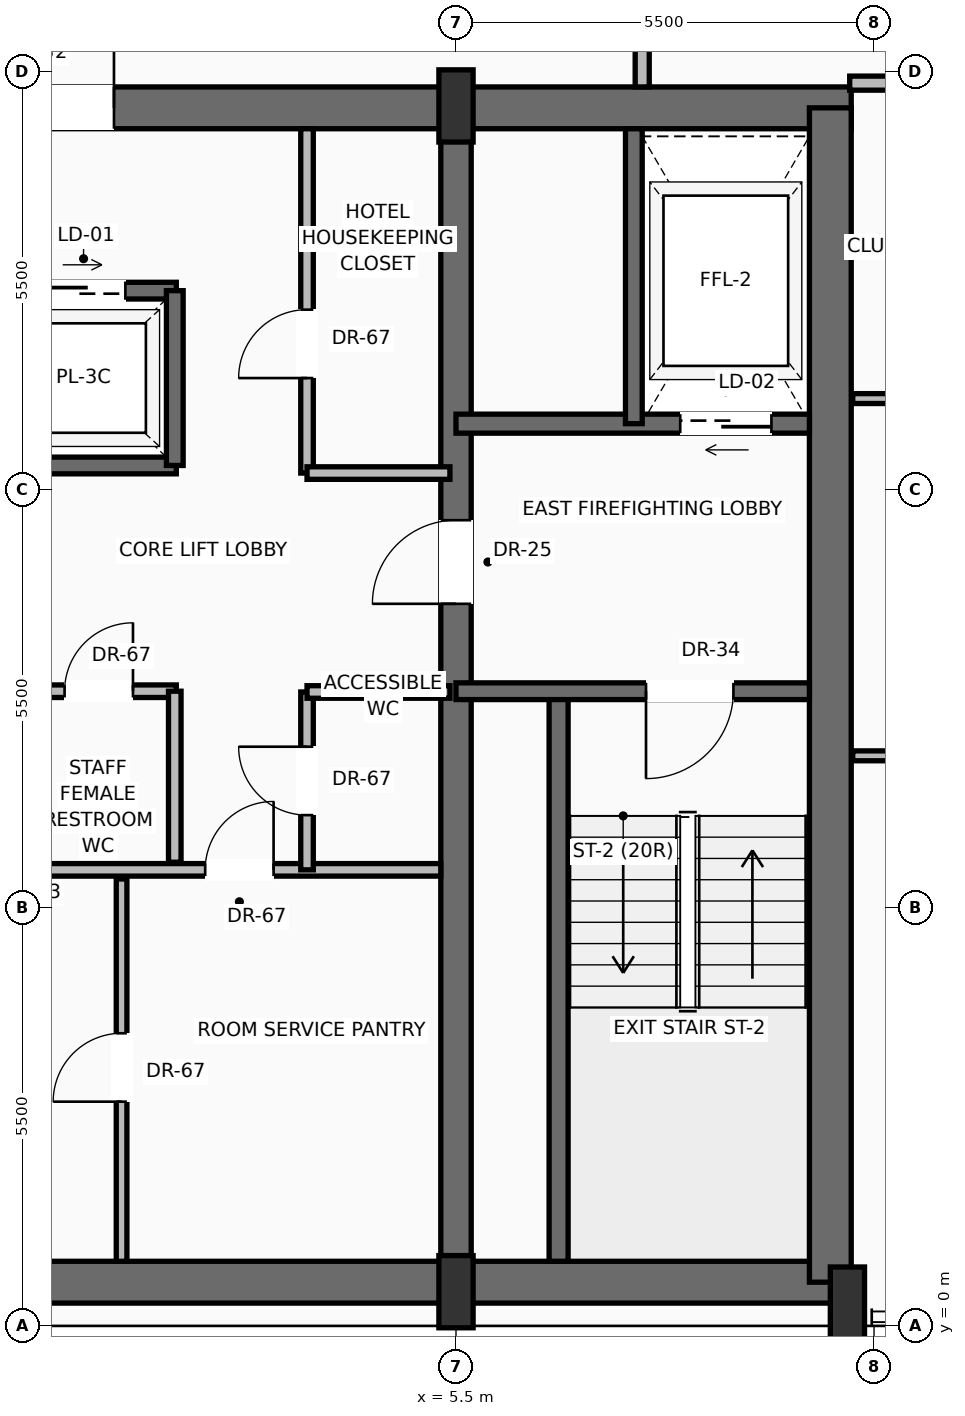
"""IFC4 building model, lengths in metres.
Left out: names, types, materials, properties, quantities, classifications, styles, units other than length and angle.
Written with IfcOpenShell. Run it as: python <this file> out.ifc"""

import sys

from ifc_helpers import new_model, si_unit, direction, frame, frame_2d, origin, origin_2d, place, context, subcontext, project, spatial, rectangle, extrude, source, transform, mapped, element, fill, save


model = new_model("IFC4")
c1 = context("Model", 3, precision=1e-05, world=origin(), true_north=direction((0.0, 1.0)))
c2 = subcontext(c1, "Body", "Model", "MODEL_VIEW")
j1 = project(units=[si_unit("LENGTHUNIT", "METRE"), si_unit("PLANEANGLEUNIT", "RADIAN")], contexts=[c1])
p1 = place(None, origin())
s1 = spatial("IfcSite", under=j1, at=p1, CompositionType="ELEMENT")
p2 = place(p1, origin())
s2 = spatial("IfcBuilding", under=s1, at=p2, CompositionType="ELEMENT")
p3 = place(p2, frame((0.0, 0.0, 237.25)))
s3 = spatial("IfcBuildingStorey", under=s2, at=p3, CompositionType="ELEMENT", Elevation=237.25)
p4 = place(p3, frame((-10.65, 0.575, 0.0), z_axis=(0.0, 0.0, 1.0), x_axis=(1.0, 0.0, 0.0)))
e1 = element("IfcWall", 1, at=p4, inside=s3, PredefinedType="SHEAR", context=c2, shape_type="SweptSolid", body=[
    extrude(rectangle(XDim=21.3, YDim=0.55, at=frame_2d((10.65, 0.0))), origin(), (0.0, 0.0, 1.0), 3.24),
])
p5 = place(p3, frame((-10.7, 16.025, 0.0), z_axis=(0.0, 0.0, 1.0), x_axis=(1.0, 0.0, 0.0)))
e2 = element("IfcWall", 2, at=p5, inside=s3, PredefinedType="SHEAR", context=c2, shape_type="SweptSolid", body=[
    extrude(rectangle(XDim=21.4, YDim=0.55, at=frame_2d((10.7, 0.0))), origin(), (0.0, 0.0, 1.0), 3.24),
])
p6 = place(p5, frame((3.27, 0.0, 0.0)))
e3 = element("IfcOpeningElement", 3, at=p6, cuts=e2, PredefinedType="OPENING", context=c2, shape_type="SweptSolid", body=[
    extrude(rectangle(XDim=1.3, YDim=2.3, at=frame_2d((0.65, 1.15))), frame((0.0, 0.285, 0.0), z_axis=(0.0, -1.0, 0.0), x_axis=(1.0, 0.0, 0.0)), (0.0, 0.0, 1.0), 0.57),
])
p7 = place(p5, frame((9.7, 0.0, 0.0)))
e4 = element("IfcOpeningElement", 4, at=p7, cuts=e2, PredefinedType="OPENING", context=c2, shape_type="SweptSolid", body=[
    extrude(rectangle(XDim=2.0, YDim=2.4, at=frame_2d((1.0, 1.2))), frame((0.0, 0.285, 0.0), z_axis=(0.0, -1.0, 0.0), x_axis=(1.0, 0.0, 0.0)), (0.0, 0.0, 1.0), 0.57),
])
p8 = place(p3, frame((10.425, 0.575, 0.0), z_axis=(0.0, 0.0, 1.0), x_axis=(0.0, 1.0, 0.0)))
e5 = element("IfcWall", 5, at=p8, inside=s3, PredefinedType="SHEAR", context=c2, shape_type="SweptSolid", body=[
    extrude(rectangle(XDim=15.45, YDim=0.55, at=frame_2d((7.725, 0.0))), origin(), (0.0, 0.0, 1.0), 3.24),
])
p9 = place(p3, frame((5.5, 0.575, 0.0), z_axis=(0.0, 0.0, 1.0), x_axis=(0.0, 1.0, 0.0)))
e6 = element("IfcWall", 6, at=p9, inside=s3, PredefinedType="SHEAR", context=c2, shape_type="SweptSolid", body=[
    extrude(rectangle(XDim=15.45, YDim=0.4, at=frame_2d((7.725, 0.0))), origin(), (0.0, 0.0, 1.0), 3.24),
])
p10 = place(p9, frame((8.925, 0.0, 0.0)))
e7 = element("IfcOpeningElement", 7, at=p10, cuts=e6, PredefinedType="OPENING", context=c2, shape_type="SweptSolid", body=[
    extrude(rectangle(XDim=1.1, YDim=2.2, at=frame_2d((0.55, 1.1))), frame((0.0, 0.21, 0.0), z_axis=(0.0, -1.0, 0.0), x_axis=(1.0, 0.0, 0.0)), (0.0, 0.0, 1.0), 0.42),
])
m1 = source(origin(), c2, "Body", "SweptSolid", [
    extrude(rectangle(XDim=0.45, YDim=0.95, at=origin_2d()), origin(), (0.0, 0.0, 1.0), 3.45),
])
for number, where, z_axis, x_axis in (
    (8, (5.5, 0.45, 0.0), (0.0, 0.0, 1.0), (1.0, 0.0, 0.0)),
    (9, (10.65, 0.3, 0.0), (0.0, 0.0, 1.0), (1.0, 0.0, 0.0)),
    (10, (5.5, 16.05, 0.0), (0.0, 0.0, 1.0), (1.0, 0.0, 0.0)),
):
    element("IfcColumn", number, at=place(p3, frame(where, z_axis=z_axis, x_axis=x_axis)), inside=s3, PredefinedType="PILASTER", context=c2, shape_type="MappedRepresentation", body=[
        mapped(m1, transform((0.0, 0.0, 0.0), scale=1.0)),
    ])
p11 = place(p3, frame((8.545, 32.072, 0.0), z_axis=(0.0, 0.0, 1.0), x_axis=(0.52585107611, -0.850576654837, 0.0)))
e11 = element("IfcWall", 11, at=p11, inside=s3, PredefinedType="SOLIDWALL", context=c2, shape_type="SweptSolid", body=[
    extrude(rectangle(XDim=19.616, YDim=0.28, at=frame_2d((9.808, 0.0))), origin(), (0.0, 0.0, 1.0), 2.82),
])
p12 = place(p11, frame((4.708, 0.0, 0.0)))
e12 = element("IfcOpeningElement", 12, at=p12, cuts=e11, PredefinedType="OPENING", context=c2, shape_type="SweptSolid", body=[
    extrude(rectangle(XDim=1.6, YDim=2.35, at=frame_2d((0.8, 1.175))), frame((0.0, 0.15, 0.0), z_axis=(0.0, -1.0, 0.0), x_axis=(1.0, 0.0, 0.0)), (0.0, 0.0, 1.0), 0.3),
])
p13 = place(p11, frame((13.339, 0.0, 0.9)))
e13 = element("IfcOpeningElement", 13, at=p13, cuts=e11, PredefinedType="OPENING", context=c2, shape_type="SweptSolid", body=[
    extrude(rectangle(XDim=1.55, YDim=1.75, at=frame_2d((0.775, 0.875))), frame((0.0, 0.15, 0.0), z_axis=(0.0, -1.0, 0.0), x_axis=(1.0, 0.0, 0.0)), (0.0, 0.0, 1.0), 0.3),
])
p14 = place(p3, frame((6.85, 0.85, 0.0), z_axis=(0.0, 0.0, 1.0), x_axis=(0.0, 1.0, 0.0)))
e14 = element("IfcWall", 14, at=p14, inside=s3, PredefinedType="SOLIDWALL", context=c2, shape_type="SweptSolid", body=[
    extrude(rectangle(XDim=7.5, YDim=0.25, at=frame_2d((3.75, 0.0))), origin(), (0.0, 0.0, 1.0), 3.24),
])
p15 = place(p3, frame((10.15, 8.35, 0.0), z_axis=(0.0, 0.0, 1.0), x_axis=(-1.0, 0.0, 0.0)))
e15 = element("IfcWall", 15, at=p15, inside=s3, PredefinedType="SOLIDWALL", context=c2, shape_type="SweptSolid", body=[
    extrude(rectangle(XDim=4.65, YDim=0.22, at=frame_2d((2.325, 0.0))), origin(), (0.0, 0.0, 1.0), 3.24),
])
p16 = place(p15, frame((1.0, 0.0, 0.0)))
e16 = element("IfcOpeningElement", 16, at=p16, cuts=e15, PredefinedType="OPENING", context=c2, shape_type="SweptSolid", body=[
    extrude(rectangle(XDim=1.15, YDim=2.2, at=frame_2d((0.575, 1.1))), frame((0.0, 0.12, 0.0), z_axis=(0.0, -1.0, 0.0), x_axis=(1.0, 0.0, 0.0)), (0.0, 0.0, 1.0), 0.24),
])
p17 = place(p3, frame((10.15, 11.87, 0.0), z_axis=(0.0, 0.0, 1.0), x_axis=(-1.0, 0.0, 0.0)))
e17 = element("IfcWall", 17, at=p17, inside=s3, PredefinedType="SOLIDWALL", context=c2, shape_type="SweptSolid", body=[
    extrude(rectangle(XDim=4.65, YDim=0.25, at=frame_2d((2.325, 0.0))), origin(), (0.0, 0.0, 1.0), 3.24),
])
p18 = place(p17, frame((0.5, 0.0, 0.0)))
e18 = element("IfcOpeningElement", 18, at=p18, cuts=e17, PredefinedType="OPENING", context=c2, shape_type="SweptSolid", body=[
    extrude(rectangle(XDim=1.2, YDim=2.25, at=frame_2d((0.6, 1.125))), frame((0.0, 0.135, 0.0), z_axis=(0.0, -1.0, 0.0), x_axis=(1.0, 0.0, 0.0)), (0.0, 0.0, 1.0), 0.27),
])
p19 = place(p3, frame((7.84, 11.87, 0.0), z_axis=(0.0, 0.0, 1.0), x_axis=(0.0, 1.0, 0.0)))
e19 = element("IfcWall", 19, at=p19, inside=s3, PredefinedType="SOLIDWALL", context=c2, shape_type="SweptSolid", body=[
    extrude(rectangle(XDim=3.88, YDim=0.22, at=frame_2d((1.94, 0.0))), origin(), (0.0, 0.0, 1.0), 3.24),
])
p20 = place(p3, frame((-5.5, 6.0, 0.0), z_axis=(0.0, 0.0, 1.0), x_axis=(1.0, 0.0, 0.0)))
e20 = element("IfcWall", 20, at=p20, inside=s3, PredefinedType="PARTITIONING", context=c2, shape_type="SweptSolid", body=[
    extrude(rectangle(XDim=10.8, YDim=0.165, at=frame_2d((5.4, 0.0))), origin(), (0.0, 0.0, 1.0), 3.232),
])
p21 = place(p20, frame((7.7, 0.0, 0.0)))
e21 = element("IfcOpeningElement", 21, at=p21, cuts=e20, PredefinedType="OPENING", context=c2, shape_type="SweptSolid", body=[
    extrude(rectangle(XDim=0.9, YDim=2.1, at=frame_2d((0.45, 1.05))), frame((0.0, 0.093, 0.0), z_axis=(0.0, -1.0, 0.0), x_axis=(1.0, 0.0, 0.0)), (0.0, 0.0, 1.0), 0.185),
])
p22 = place(p3, frame((1.1, 0.85, 0.0), z_axis=(0.0, 0.0, 1.0), x_axis=(0.0, 1.0, 0.0)))
e22 = element("IfcWall", 22, at=p22, inside=s3, PredefinedType="PARTITIONING", context=c2, shape_type="SweptSolid", body=[
    extrude(rectangle(XDim=5.03, YDim=0.14, at=frame_2d((2.515, 0.0))), origin(), (0.0, 0.0, 1.0), 3.232),
])
p23 = place(p22, frame((2.1, 0.0, 0.0)))
e23 = element("IfcOpeningElement", 23, at=p23, cuts=e22, PredefinedType="OPENING", context=c2, shape_type="SweptSolid", body=[
    extrude(rectangle(XDim=0.9, YDim=2.1, at=frame_2d((0.45, 1.05))), frame((0.0, 0.08, 0.0), z_axis=(0.0, -1.0, 0.0), x_axis=(1.0, 0.0, 0.0)), (0.0, 0.0, 1.0), 0.16),
])
p24 = place(p3, frame((3.54, 6.0, 0.0), z_axis=(0.0, 0.0, 1.0), x_axis=(0.0, 1.0, 0.0)))
e24 = element("IfcWall", 24, at=p24, inside=s3, PredefinedType="PARTITIONING", context=c2, shape_type="SweptSolid", body=[
    extrude(rectangle(XDim=2.34, YDim=0.165, at=frame_2d((1.17, 0.0))), origin(), (0.0, 0.0, 1.0), 3.232),
])
p25 = place(p24, frame((0.72, 0.0, 0.0)))
e25 = element("IfcOpeningElement", 25, at=p25, cuts=e24, PredefinedType="OPENING", context=c2, shape_type="SweptSolid", body=[
    extrude(rectangle(XDim=0.9, YDim=2.1, at=frame_2d((0.45, 1.05))), frame((0.0, 0.093, 0.0), z_axis=(0.0, -1.0, 0.0), x_axis=(1.0, 0.0, 0.0)), (0.0, 0.0, 1.0), 0.185),
])
p26 = place(p3, frame((3.54, 8.34, 0.0), z_axis=(0.0, 0.0, 1.0), x_axis=(1.0, 0.0, 0.0)))
e26 = element("IfcWall", 26, at=p26, inside=s3, PredefinedType="PARTITIONING", context=c2, shape_type="SweptSolid", body=[
    extrude(rectangle(XDim=1.88, YDim=0.165, at=frame_2d((0.94, 0.0))), origin(), (0.0, 0.0, 1.0), 3.232),
])
p27 = place(p3, frame((-5.3, 8.35, 0.0), z_axis=(0.0, 0.0, 1.0), x_axis=(1.0, 0.0, 0.0)))
e27 = element("IfcWall", 27, at=p27, inside=s3, PredefinedType="PARTITIONING", context=c2, shape_type="SweptSolid", body=[
    extrude(rectangle(XDim=7.12, YDim=0.165, at=frame_2d((3.56, 0.0))), origin(), (0.0, 0.0, 1.0), 3.232),
])
p28 = place(p27, frame((0.85, 0.0, 0.0)))
e28 = element("IfcOpeningElement", 28, at=p28, cuts=e27, PredefinedType="OPENING", context=c2, shape_type="SweptSolid", body=[
    extrude(rectangle(XDim=0.9, YDim=2.1, at=frame_2d((0.45, 1.05))), frame((0.0, 0.093, 0.0), z_axis=(0.0, -1.0, 0.0), x_axis=(1.0, 0.0, 0.0)), (0.0, 0.0, 1.0), 0.185),
])
p29 = place(p27, frame((5.65, 0.0, 0.0)))
e29 = element("IfcOpeningElement", 29, at=p29, cuts=e27, PredefinedType="OPENING", context=c2, shape_type="SweptSolid", body=[
    extrude(rectangle(XDim=0.9, YDim=2.1, at=frame_2d((0.45, 1.05))), frame((0.0, 0.093, 0.0), z_axis=(0.0, -1.0, 0.0), x_axis=(1.0, 0.0, 0.0)), (0.0, 0.0, 1.0), 0.185),
])
p30 = place(p3, frame((1.8, 6.1, 0.0), z_axis=(0.0, 0.0, 1.0), x_axis=(0.0, 1.0, 0.0)))
e30 = element("IfcWall", 30, at=p30, inside=s3, PredefinedType="PARTITIONING", context=c2, shape_type="SweptSolid", body=[
    extrude(rectangle(XDim=2.25, YDim=0.165, at=frame_2d((1.125, 0.0))), origin(), (0.0, 0.0, 1.0), 3.232),
])
p31 = place(p3, frame((-5.5, 11.32, 0.0), z_axis=(0.0, 0.0, 1.0), x_axis=(1.0, 0.0, 0.0)))
e31 = element("IfcWall", 31, at=p31, inside=s3, PredefinedType="SOLIDWALL", context=c2, shape_type="SweptSolid", body=[
    extrude(rectangle(XDim=7.32, YDim=0.22, at=frame_2d((3.66, 0.0))), origin(), (0.0, 0.0, 1.0), 3.24),
])
p32 = place(p3, frame((-5.5, 13.62, 0.0), z_axis=(0.0, 0.0, 1.0), x_axis=(1.0, 0.0, 0.0)))
e32 = element("IfcWall", 32, at=p32, inside=s3, PredefinedType="SOLIDWALL", context=c2, shape_type="SweptSolid", body=[
    extrude(rectangle(XDim=7.32, YDim=0.22, at=frame_2d((3.66, 0.0))), origin(), (0.0, 0.0, 1.0), 3.24),
])
p33 = place(p32, frame((0.75, 0.0, 0.0)))
e33 = element("IfcOpeningElement", 33, at=p33, cuts=e32, PredefinedType="OPENING", context=c2, shape_type="SweptSolid", body=[
    extrude(rectangle(XDim=1.1, YDim=2.2, at=frame_2d((0.55, 1.1))), frame((0.0, 0.12, 0.0), z_axis=(0.0, -1.0, 0.0), x_axis=(1.0, 0.0, 0.0)), (0.0, 0.0, 1.0), 0.24),
])
p34 = place(p32, frame((3.15, 0.0, 0.0)))
e34 = element("IfcOpeningElement", 34, at=p34, cuts=e32, PredefinedType="OPENING", context=c2, shape_type="SweptSolid", body=[
    extrude(rectangle(XDim=1.1, YDim=2.2, at=frame_2d((0.55, 1.1))), frame((0.0, 0.12, 0.0), z_axis=(0.0, -1.0, 0.0), x_axis=(1.0, 0.0, 0.0)), (0.0, 0.0, 1.0), 0.24),
])
p35 = place(p32, frame((5.55, 0.0, 0.0)))
e35 = element("IfcOpeningElement", 35, at=p35, cuts=e32, PredefinedType="OPENING", context=c2, shape_type="SweptSolid", body=[
    extrude(rectangle(XDim=1.1, YDim=2.2, at=frame_2d((0.55, 1.1))), frame((0.0, 0.12, 0.0), z_axis=(0.0, -1.0, 0.0), x_axis=(1.0, 0.0, 0.0)), (0.0, 0.0, 1.0), 0.24),
])
p36 = place(p3, frame((1.8, 11.32, 0.0), z_axis=(0.0, 0.0, 1.0), x_axis=(0.0, 1.0, 0.0)))
e36 = element("IfcWall", 36, at=p36, inside=s3, PredefinedType="SOLIDWALL", context=c2, shape_type="SweptSolid", body=[
    extrude(rectangle(XDim=2.3, YDim=0.22, at=frame_2d((1.15, 0.0))), origin(), (0.0, 0.0, 1.0), 3.24),
])
p37 = place(p3, frame((3.54, 11.22, 0.0), z_axis=(0.0, 0.0, 1.0), x_axis=(0.0, 1.0, 0.0)))
e37 = element("IfcWall", 37, at=p37, inside=s3, PredefinedType="PARTITIONING", context=c2, shape_type="SweptSolid", body=[
    extrude(rectangle(XDim=4.53, YDim=0.165, at=frame_2d((2.265, 0.0))), origin(), (0.0, 0.0, 1.0), 3.232),
])
p38 = place(p37, frame((1.25, 0.0, 0.0)))
e38 = element("IfcOpeningElement", 38, at=p38, cuts=e37, PredefinedType="OPENING", context=c2, shape_type="SweptSolid", body=[
    extrude(rectangle(XDim=0.9, YDim=2.1, at=frame_2d((0.45, 1.05))), frame((0.0, 0.093, 0.0), z_axis=(0.0, -1.0, 0.0), x_axis=(1.0, 0.0, 0.0)), (0.0, 0.0, 1.0), 0.185),
])
p39 = place(p3, frame((3.54, 11.22, 0.0), z_axis=(0.0, 0.0, 1.0), x_axis=(1.0, 0.0, 0.0)))
e39 = element("IfcWall", 39, at=p39, inside=s3, PredefinedType="PARTITIONING", context=c2, shape_type="SweptSolid", body=[
    extrude(rectangle(XDim=1.88, YDim=0.165, at=frame_2d((0.94, 0.0))), origin(), (0.0, 0.0, 1.0), 3.232),
])
p40 = place(p3, frame((7.95, 16.3, 0.0), z_axis=(0.0, 0.0, 1.0), x_axis=(0.0, 1.0, 0.0)))
e40 = element("IfcWall", 40, at=p40, inside=s3, PredefinedType="PARTITIONING", context=c2, shape_type="SweptSolid", body=[
    extrude(rectangle(XDim=10.5, YDim=0.185, at=frame_2d((5.25, 0.0))), origin(), (0.0, 0.0, 1.0), 3.232),
])
p41 = place(p40, frame((3.088, 0.0, 0.0)))
e41 = element("IfcOpeningElement", 41, at=p41, cuts=e40, PredefinedType="OPENING", context=c2, shape_type="SweptSolid", body=[
    extrude(rectangle(XDim=1.05, YDim=2.25, at=frame_2d((0.525, 1.125))), frame((0.0, 0.103, 0.0), z_axis=(0.0, -1.0, 0.0), x_axis=(1.0, 0.0, 0.0)), (0.0, 0.0, 1.0), 0.205),
])
p42 = place(p3, frame((10.68, 16.35, 0.0), z_axis=(0.0, 0.0, 1.0), x_axis=(1.0, 0.0, 0.0)))
e42 = element("IfcWall", 42, at=p42, inside=s3, PredefinedType="PARTITIONING", context=c2, shape_type="SweptSolid", body=[
    extrude(rectangle(XDim=7.737, YDim=0.185, at=frame_2d((3.869, 0.0))), origin(), (0.0, 0.0, 1.0), 3.232),
])
p43 = place(p42, frame((2.285, 0.0, 0.0)))
e43 = element("IfcOpeningElement", 43, at=p43, cuts=e42, PredefinedType="OPENING", context=c2, shape_type="SweptSolid", body=[
    extrude(rectangle(XDim=1.05, YDim=2.25, at=frame_2d((0.525, 1.125))), frame((0.0, 0.103, 0.0), z_axis=(0.0, -1.0, 0.0), x_axis=(1.0, 0.0, 0.0)), (0.0, 0.0, 1.0), 0.205),
])
p44 = place(p3, frame((10.72, 7.5, 0.0), z_axis=(0.0, 0.0, 1.0), x_axis=(1.0, 0.0, 0.0)))
e44 = element("IfcWall", 44, at=p44, inside=s3, PredefinedType="PARTITIONING", context=c2, shape_type="SweptSolid", body=[
    extrude(rectangle(XDim=13.168, YDim=0.13, at=frame_2d((6.584, 0.0))), origin(), (0.0, 0.0, 1.0), 3.232),
])
p45 = place(p44, frame((5.485, 0.0, 0.0)))
e45 = element("IfcOpeningElement", 45, at=p45, cuts=e44, PredefinedType="OPENING", context=c2, shape_type="SweptSolid", body=[
    extrude(rectangle(XDim=0.95, YDim=2.2, at=frame_2d((0.475, 1.1))), frame((0.0, 0.075, 0.0), z_axis=(0.0, -1.0, 0.0), x_axis=(1.0, 0.0, 0.0)), (0.0, 0.0, 1.0), 0.15),
])
p46 = place(p3, frame((10.72, 12.2, 0.0), z_axis=(0.0, 0.0, 1.0), x_axis=(1.0, 0.0, 0.0)))
e46 = element("IfcWall", 46, at=p46, inside=s3, PredefinedType="PARTITIONING", context=c2, shape_type="SweptSolid", body=[
    extrude(rectangle(XDim=10.263, YDim=0.13, at=frame_2d((5.131, 0.0))), origin(), (0.0, 0.0, 1.0), 3.232),
])
p47 = place(p46, frame((4.177, 0.0, 0.0)))
e47 = element("IfcOpeningElement", 47, at=p47, cuts=e46, PredefinedType="OPENING", context=c2, shape_type="SweptSolid", body=[
    extrude(rectangle(XDim=0.95, YDim=2.2, at=frame_2d((0.475, 1.1))), frame((0.0, 0.075, 0.0), z_axis=(0.0, -1.0, 0.0), x_axis=(1.0, 0.0, 0.0)), (0.0, 0.0, 1.0), 0.15),
])
m2 = source(origin(), c2, "Body", "SweptSolid", [
    extrude(rectangle(XDim=1.15, YDim=2.2, at=frame_2d((0.575, 1.1))), frame((0.0, 0.025, 0.0), z_axis=(0.0, -1.0, 0.0), x_axis=(1.0, 0.0, 0.0)), (0.0, 0.0, 1.0), 0.05),
])
p48 = place(p16, origin())
e48 = element("IfcDoor", 48, at=p48, inside=s3, OperationType="SINGLE_SWING_RIGHT", PredefinedType="DOOR", context=c2, shape_type="MappedRepresentation", body=[
    mapped(m2, transform((0.0, 0.0, 0.0), scale=1.0)),
])
fill(e16, e48)
m3 = source(origin(), c2, "Body", "SweptSolid", [
    extrude(rectangle(XDim=1.1, YDim=2.2, at=frame_2d((0.55, 1.1))), frame((0.0, 0.025, 0.0), z_axis=(0.0, -1.0, 0.0), x_axis=(1.0, 0.0, 0.0)), (0.0, 0.0, 1.0), 0.05),
])
p49 = place(p10, origin())
e49 = element("IfcDoor", 49, at=p49, inside=s3, OperationType="SINGLE_SWING_LEFT", PredefinedType="DOOR", context=c2, shape_type="MappedRepresentation", body=[
    mapped(m3, transform((0.0, 0.0, 0.0), scale=1.0)),
])
fill(e7, e49)
m4 = source(origin(), c2, "Body", "SweptSolid", [
    extrude(rectangle(XDim=1.2, YDim=2.25, at=frame_2d((0.6, 1.125))), frame((0.0, 0.025, 0.0), z_axis=(0.0, -1.0, 0.0), x_axis=(1.0, 0.0, 0.0)), (0.0, 0.0, 1.0), 0.05),
])
p50 = place(p18, origin())
e50 = element("IfcDoor", 50, at=p50, inside=s3, OperationType="SLIDING_TO_RIGHT", PredefinedType="DOOR", context=c2, shape_type="MappedRepresentation", body=[
    mapped(m4, transform((0.0, 0.0, 0.0), scale=1.0)),
])
fill(e18, e50)
m5 = source(origin(), c2, "Body", "SweptSolid", [
    extrude(rectangle(XDim=2.0, YDim=2.4, at=frame_2d((1.0, 1.2))), frame((0.0, 0.025, 0.0), z_axis=(0.0, -1.0, 0.0), x_axis=(1.0, 0.0, 0.0)), (0.0, 0.0, 1.0), 0.05),
])
p51 = place(p7, origin())
e51 = element("IfcDoor", 51, at=p51, inside=s3, OperationType="DOUBLE_DOOR_SINGLE_SWING", PredefinedType="DOOR", context=c2, shape_type="MappedRepresentation", body=[
    mapped(m5, transform((0.0, 0.0, 0.0), scale=1.0)),
])
fill(e4, e51)
m6 = source(origin(), c2, "Body", "SweptSolid", [
    extrude(rectangle(XDim=0.9, YDim=2.1, at=frame_2d((0.45, 1.05))), frame((0.0, 0.025, 0.0), z_axis=(0.0, -1.0, 0.0), x_axis=(1.0, 0.0, 0.0)), (0.0, 0.0, 1.0), 0.05),
])
p52 = place(p21, origin())
e52 = element("IfcDoor", 52, at=p52, inside=s3, OperationType="SINGLE_SWING_RIGHT", PredefinedType="DOOR", context=c2, shape_type="MappedRepresentation", body=[
    mapped(m6, transform((0.0, 0.0, 0.0), scale=1.0)),
])
fill(e21, e52)
p53 = place(p23, origin())
e53 = element("IfcDoor", 53, at=p53, inside=s3, OperationType="SINGLE_SWING_LEFT", PredefinedType="DOOR", context=c2, shape_type="MappedRepresentation", body=[
    mapped(m6, transform((0.0, 0.0, 0.0), scale=1.0)),
])
fill(e23, e53)
p54 = place(p25, origin())
e54 = element("IfcDoor", 54, at=p54, inside=s3, OperationType="SINGLE_SWING_RIGHT", PredefinedType="DOOR", context=c2, shape_type="MappedRepresentation", body=[
    mapped(m6, transform((0.0, 0.0, 0.0), scale=1.0)),
])
fill(e25, e54)
p55 = place(p29, origin())
e55 = element("IfcDoor", 55, at=p55, inside=s3, OperationType="SINGLE_SWING_RIGHT", PredefinedType="DOOR", context=c2, shape_type="MappedRepresentation", body=[
    mapped(m6, transform((0.0, 0.0, 0.0), scale=1.0)),
])
fill(e29, e55)
m7 = source(origin(), c2, "Body", "SweptSolid", [
    extrude(rectangle(XDim=1.1, YDim=2.2, at=frame_2d((0.55, 1.1))), frame((0.0, 0.025, 0.0), z_axis=(0.0, -1.0, 0.0), x_axis=(1.0, 0.0, 0.0)), (0.0, 0.0, 1.0), 0.05),
])
p56 = place(p35, origin())
e56 = element("IfcDoor", 56, at=p56, inside=s3, OperationType="SLIDING_TO_RIGHT", PredefinedType="DOOR", context=c2, shape_type="MappedRepresentation", body=[
    mapped(m7, transform((0.0, 0.0, 0.0), scale=1.0)),
])
fill(e35, e56)
p57 = place(p38, origin())
e57 = element("IfcDoor", 57, at=p57, inside=s3, OperationType="SINGLE_SWING_LEFT", PredefinedType="DOOR", context=c2, shape_type="MappedRepresentation", body=[
    mapped(m6, transform((0.0, 0.0, 0.0), scale=1.0)),
])
fill(e38, e57)
save(model, sys.argv[1])
